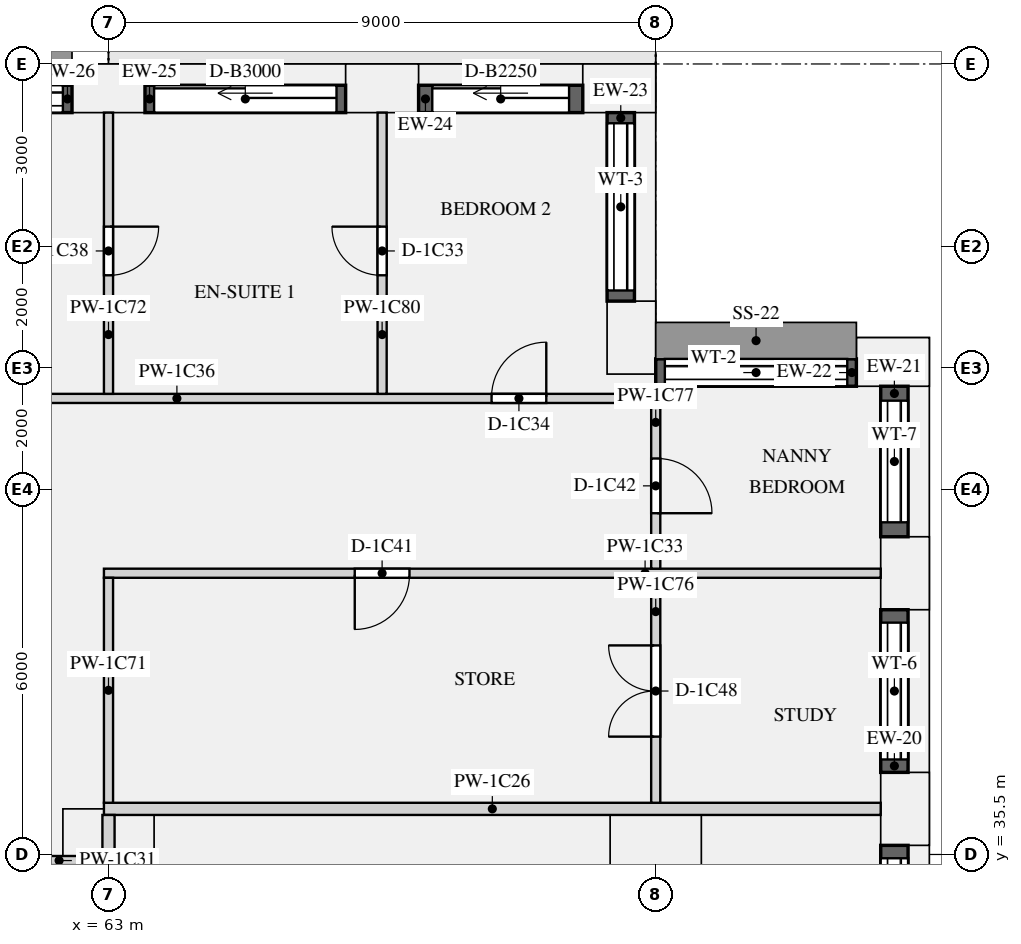
"""IFC4 building model, lengths in metres.
Left out: names, types, materials, properties, quantities, classifications, styles, units other than length and angle.
Written with IfcOpenShell. Run it as: python <this file> out.ifc"""

import sys

from ifc_helpers import new_model, si_unit, direction, frame, frame_2d, origin, origin_2d, place, context, subcontext, project, spatial, rectangle, extrude, element, fill, save


model = new_model("IFC4")
c1 = context("Model", 3, precision=1e-05, world=origin(), true_north=direction((0.0, 1.0)))
c2 = subcontext(c1, "Body", "Model", "MODEL_VIEW")
j1 = project(units=[si_unit("LENGTHUNIT", "METRE"), si_unit("PLANEANGLEUNIT", "RADIAN")], contexts=[c1])
p1 = place(None, origin())
s1 = spatial("IfcSite", under=j1, at=p1, CompositionType="ELEMENT")
p2 = place(p1, origin())
s2 = spatial("IfcBuilding", under=s1, at=p2, CompositionType="ELEMENT")
p3 = place(p2, frame((0.0, 0.0, 38.4)))
s3 = spatial("IfcBuildingStorey", under=s2, at=p3, CompositionType="ELEMENT", Elevation=38.4)
for number, where, z_axis, x_axis in (
    (1, (76.1, 36.25, 0.0), (0.0, 0.0, 1.0), (0.0, 1.0, 0.0)),
    (2, (76.1, 40.125, 0.0), (0.0, 0.0, 1.0), (0.0, 1.0, 0.0)),
    (3, (75.9, 43.6, 0.0), (0.0, 0.0, 1.0), (-1.0, 0.0, 0.0)),
    (4, (71.6, 44.0, 0.0), (0.0, 0.0, 1.0), (0.0, 1.0, 0.0)),
    (5, (71.4, 48.1, 0.0), (0.0, 0.0, 1.0), (-1.0, 0.0, 0.0)),
    (6, (67.5, 48.1, 0.0), (0.0, 0.0, 1.0), (-1.0, 0.0, 0.0)),
    (7, (63.0, 48.1, 0.0), (0.0, 0.0, 1.0), (-1.0, 0.0, 0.0)),
):
    element("IfcColumn", number, at=place(p3, frame(where, z_axis=z_axis, x_axis=x_axis)), inside=s3, PredefinedType="USERDEFINED", context=c2, shape_type="SweptSolid", body=[
        extrude(rectangle(XDim=1.2, YDim=0.8, at=origin_2d()), origin(), (0.0, 0.0, 1.0), 3.15),
    ])
for number, where, z_axis, x_axis in (
    (8, (63.0, 35.5, 0.0), (0.0, 0.0, 1.0), (1.0, 0.0, 0.0)),
    (9, (72.0, 35.5, 0.0), (0.0, 0.0, 1.0), (1.0, 0.0, 0.0)),
):
    element("IfcColumn", number, at=place(p3, frame(where, z_axis=z_axis, x_axis=x_axis)), inside=s3, PredefinedType="COLUMN", context=c2, shape_type="SweptSolid", body=[
        extrude(rectangle(XDim=1.5, YDim=1.5, at=origin_2d()), origin(), (0.0, 0.0, 1.0), 3.15),
    ])
p4 = place(p3, frame((75.925, 32.975, 0.9), z_axis=(0.0, 0.0, 1.0), x_axis=(0.0, 1.0, 0.0)))
e10 = element("IfcWall", 10, at=p4, inside=s3, PredefinedType="SOLIDWALL", context=c2, shape_type="SweptSolid", body=[
    extrude(rectangle(XDim=2.675, YDim=0.45, at=frame_2d((1.337, 0.0))), origin(), (0.0, 0.0, 1.0), 1.93),
])
p5 = place(p4, frame((0.212, 0.0, 0.15)))
e11 = element("IfcOpeningElement", 11, at=p5, cuts=e10, PredefinedType="OPENING", context=c2, shape_type="SweptSolid", body=[
    extrude(rectangle(XDim=2.25, YDim=1.5, at=frame_2d((1.125, 0.75))), frame((0.0, 0.235, 0.0), z_axis=(0.0, -1.0, 0.0), x_axis=(1.0, 0.0, 0.0)), (0.0, 0.0, 1.0), 0.47),
])
p6 = place(p3, frame((75.925, 36.85, 0.9), z_axis=(0.0, 0.0, 1.0), x_axis=(0.0, 1.0, 0.0)))
e12 = element("IfcWall", 12, at=p6, inside=s3, PredefinedType="SOLIDWALL", context=c2, shape_type="SweptSolid", body=[
    extrude(rectangle(XDim=2.675, YDim=0.45, at=frame_2d((1.337, 0.0))), origin(), (0.0, 0.0, 1.0), 1.93),
])
p7 = place(p6, frame((0.212, 0.0, 0.15)))
e13 = element("IfcOpeningElement", 13, at=p7, cuts=e12, PredefinedType="OPENING", context=c2, shape_type="SweptSolid", body=[
    extrude(rectangle(XDim=2.25, YDim=1.5, at=frame_2d((1.125, 0.75))), frame((0.0, 0.235, 0.0), z_axis=(0.0, -1.0, 0.0), x_axis=(1.0, 0.0, 0.0)), (0.0, 0.0, 1.0), 0.47),
])
p8 = place(p3, frame((75.925, 40.725, 0.9), z_axis=(0.0, 0.0, 1.0), x_axis=(0.0, 1.0, 0.0)))
e14 = element("IfcWall", 14, at=p8, inside=s3, PredefinedType="SOLIDWALL", context=c2, shape_type="SweptSolid", body=[
    extrude(rectangle(XDim=2.475, YDim=0.45, at=frame_2d((1.237, 0.0))), origin(), (0.0, 0.0, 1.0), 1.93),
])
p9 = place(p8, frame((0.238, 0.0, 0.15)))
e15 = element("IfcOpeningElement", 15, at=p9, cuts=e14, PredefinedType="OPENING", context=c2, shape_type="SweptSolid", body=[
    extrude(rectangle(XDim=2.0, YDim=1.5, at=frame_2d((1.0, 0.75))), frame((0.0, 0.235, 0.0), z_axis=(0.0, -1.0, 0.0), x_axis=(1.0, 0.0, 0.0)), (0.0, 0.0, 1.0), 0.47),
])
p10 = place(p3, frame((75.3, 43.425, 0.9), z_axis=(0.0, 0.0, 1.0), x_axis=(-1.0, 0.0, 0.0)))
e16 = element("IfcWall", 16, at=p10, inside=s3, PredefinedType="SOLIDWALL", context=c2, shape_type="SweptSolid", body=[
    extrude(rectangle(XDim=3.3, YDim=0.45, at=frame_2d((1.65, 0.0))), origin(), (0.0, 0.0, 1.0), 1.93),
])
p11 = place(p10, frame((0.15, 0.0, 0.15)))
e17 = element("IfcOpeningElement", 17, at=p11, cuts=e16, PredefinedType="OPENING", context=c2, shape_type="SweptSolid", body=[
    extrude(rectangle(XDim=3.0, YDim=1.5, at=frame_2d((1.5, 0.75))), frame((0.0, 0.235, 0.0), z_axis=(0.0, -1.0, 0.0), x_axis=(1.0, 0.0, 0.0)), (0.0, 0.0, 1.0), 0.47),
])
p12 = place(p3, frame((71.425, 44.6, 0.9), z_axis=(0.0, 0.0, 1.0), x_axis=(0.0, 1.0, 0.0)))
e18 = element("IfcWall", 18, at=p12, inside=s3, PredefinedType="SOLIDWALL", context=c2, shape_type="SweptSolid", body=[
    extrude(rectangle(XDim=3.1, YDim=0.45, at=frame_2d((1.55, 0.0))), origin(), (0.0, 0.0, 1.0), 1.93),
])
p13 = place(p12, frame((0.175, 0.0, 0.15)))
e19 = element("IfcOpeningElement", 19, at=p13, cuts=e18, PredefinedType="OPENING", context=c2, shape_type="SweptSolid", body=[
    extrude(rectangle(XDim=2.75, YDim=1.5, at=frame_2d((1.375, 0.75))), frame((0.0, 0.235, 0.0), z_axis=(0.0, -1.0, 0.0), x_axis=(1.0, 0.0, 0.0)), (0.0, 0.0, 1.0), 0.47),
])
p14 = place(p3, frame((70.8, 47.925, 0.0), z_axis=(0.0, 0.0, 1.0), x_axis=(-1.0, 0.0, 0.0)))
e20 = element("IfcWall", 20, at=p14, inside=s3, PredefinedType="SOLIDWALL", context=c2, shape_type="SweptSolid", body=[
    extrude(rectangle(XDim=2.7, YDim=0.45, at=frame_2d((1.35, 0.0))), origin(), (0.0, 0.0, 1.0), 2.83),
])
p15 = place(p14, frame((0.225, 0.0, 0.0)))
e21 = element("IfcOpeningElement", 21, at=p15, cuts=e20, PredefinedType="OPENING", context=c2, shape_type="SweptSolid", body=[
    extrude(rectangle(XDim=2.25, YDim=2.3, at=frame_2d((1.125, 1.15))), frame((0.0, 0.235, 0.0), z_axis=(0.0, -1.0, 0.0), x_axis=(1.0, 0.0, 0.0)), (0.0, 0.0, 1.0), 0.47),
])
p16 = place(p3, frame((66.9, 47.925, 0.0), z_axis=(0.0, 0.0, 1.0), x_axis=(-1.0, 0.0, 0.0)))
e22 = element("IfcWall", 22, at=p16, inside=s3, PredefinedType="SOLIDWALL", context=c2, shape_type="SweptSolid", body=[
    extrude(rectangle(XDim=3.3, YDim=0.45, at=frame_2d((1.65, 0.0))), origin(), (0.0, 0.0, 1.0), 2.83),
])
p17 = place(p16, frame((0.15, 0.0, 0.0)))
e23 = element("IfcOpeningElement", 23, at=p17, cuts=e22, PredefinedType="OPENING", context=c2, shape_type="SweptSolid", body=[
    extrude(rectangle(XDim=3.0, YDim=2.3, at=frame_2d((1.5, 1.15))), frame((0.0, 0.235, 0.0), z_axis=(0.0, -1.0, 0.0), x_axis=(1.0, 0.0, 0.0)), (0.0, 0.0, 1.0), 0.47),
])
p18 = place(p3, frame((62.4, 47.925, 0.9), z_axis=(0.0, 0.0, 1.0), x_axis=(-1.0, 0.0, 0.0)))
e24 = element("IfcWall", 24, at=p18, inside=s3, PredefinedType="SOLIDWALL", context=c2, shape_type="SweptSolid", body=[
    extrude(rectangle(XDim=3.3, YDim=0.45, at=frame_2d((1.65, 0.0))), origin(), (0.0, 0.0, 1.0), 1.93),
])
p19 = place(p18, frame((0.15, 0.0, 0.15)))
e25 = element("IfcOpeningElement", 25, at=p19, cuts=e24, PredefinedType="OPENING", context=c2, shape_type="SweptSolid", body=[
    extrude(rectangle(XDim=3.0, YDim=1.5, at=frame_2d((1.5, 0.75))), frame((0.0, 0.235, 0.0), z_axis=(0.0, -1.0, 0.0), x_axis=(1.0, 0.0, 0.0)), (0.0, 0.0, 1.0), 0.47),
])
p20 = place(p3, frame((62.925, 36.25, 0.0), z_axis=(0.0, 0.0, 1.0), x_axis=(1.0, 0.0, 0.0)))
e26 = element("IfcWall", 26, at=p20, inside=s3, PredefinedType="PARTITIONING", context=c2, shape_type="SweptSolid", body=[
    extrude(rectangle(XDim=12.775, YDim=0.2, at=frame_2d((6.387, 0.0))), origin(), (0.0, 0.0, 1.0), 2.83),
])
p21 = place(p3, frame((59.8, 35.4, 0.0), z_axis=(0.0, 0.0, 1.0), x_axis=(1.0, 0.0, 0.0)))
e27 = element("IfcWall", 27, at=p21, inside=s3, PredefinedType="PARTITIONING", context=c2, shape_type="SweptSolid", body=[
    extrude(rectangle(XDim=3.1, YDim=0.15, at=frame_2d((1.55, 0.0))), origin(), (0.0, 0.0, 1.0), 2.83),
])
p22 = place(p21, frame((0.775, 0.0, 0.0)))
e28 = element("IfcOpeningElement", 28, at=p22, cuts=e27, PredefinedType="OPENING", context=c2, shape_type="SweptSolid", body=[
    extrude(rectangle(XDim=0.9, YDim=2.1, at=frame_2d((0.45, 1.05))), frame((0.0, 0.085, 0.0), z_axis=(0.0, -1.0, 0.0), x_axis=(1.0, 0.0, 0.0)), (0.0, 0.0, 1.0), 0.17),
])
p23 = place(p3, frame((62.925, 40.125, 0.0), z_axis=(0.0, 0.0, 1.0), x_axis=(1.0, 0.0, 0.0)))
e29 = element("IfcWall", 29, at=p23, inside=s3, PredefinedType="PARTITIONING", context=c2, shape_type="SweptSolid", body=[
    extrude(rectangle(XDim=12.775, YDim=0.15, at=frame_2d((6.387, 0.0))), origin(), (0.0, 0.0, 1.0), 2.83),
])
p24 = place(p23, frame((4.125, 0.0, 0.0)))
e30 = element("IfcOpeningElement", 30, at=p24, cuts=e29, PredefinedType="OPENING", context=c2, shape_type="SweptSolid", body=[
    extrude(rectangle(XDim=0.9, YDim=2.1, at=frame_2d((0.45, 1.05))), frame((0.0, 0.085, 0.0), z_axis=(0.0, -1.0, 0.0), x_axis=(1.0, 0.0, 0.0)), (0.0, 0.0, 1.0), 0.17),
])
p25 = place(p3, frame((54.075, 43.0, 0.0), z_axis=(0.0, 0.0, 1.0), x_axis=(1.0, 0.0, 0.0)))
e31 = element("IfcWall", 31, at=p25, inside=s3, PredefinedType="PARTITIONING", context=c2, shape_type="SweptSolid", body=[
    extrude(rectangle(XDim=17.85, YDim=0.15, at=frame_2d((8.925, 0.0))), origin(), (0.0, 0.0, 1.0), 2.83),
])
p26 = place(p25, frame((15.225, 0.0, 0.0)))
e32 = element("IfcOpeningElement", 32, at=p26, cuts=e31, PredefinedType="OPENING", context=c2, shape_type="SweptSolid", body=[
    extrude(rectangle(XDim=0.9, YDim=2.1, at=frame_2d((0.45, 1.05))), frame((0.0, 0.085, 0.0), z_axis=(0.0, -1.0, 0.0), x_axis=(1.0, 0.0, 0.0)), (0.0, 0.0, 1.0), 0.17),
])
p27 = place(p25, frame((3.975, 0.0, 0.0)))
e33 = element("IfcOpeningElement", 33, at=p27, cuts=e31, PredefinedType="OPENING", context=c2, shape_type="SweptSolid", body=[
    extrude(rectangle(XDim=0.9, YDim=2.1, at=frame_2d((0.45, 1.05))), frame((0.0, 0.085, 0.0), z_axis=(0.0, -1.0, 0.0), x_axis=(1.0, 0.0, 0.0)), (0.0, 0.0, 1.0), 0.17),
])
p28 = place(p3, frame((63.0, 36.35, 0.0), z_axis=(0.0, 0.0, 1.0), x_axis=(0.0, 1.0, 0.0)))
e34 = element("IfcWall", 34, at=p28, inside=s3, PredefinedType="PARTITIONING", context=c2, shape_type="SweptSolid", body=[
    extrude(rectangle(XDim=3.7, YDim=0.15, at=frame_2d((1.85, 0.0))), origin(), (0.0, 0.0, 1.0), 2.83),
])
p29 = place(p3, frame((63.0, 43.075, 0.0), z_axis=(0.0, 0.0, 1.0), x_axis=(0.0, 1.0, 0.0)))
e35 = element("IfcWall", 35, at=p29, inside=s3, PredefinedType="PARTITIONING", context=c2, shape_type="SweptSolid", body=[
    extrude(rectangle(XDim=4.625, YDim=0.15, at=frame_2d((2.312, 0.0))), origin(), (0.0, 0.0, 1.0), 2.83),
])
p30 = place(p29, frame((1.95, 0.0, 0.0)))
e36 = element("IfcOpeningElement", 36, at=p30, cuts=e35, PredefinedType="OPENING", context=c2, shape_type="SweptSolid", body=[
    extrude(rectangle(XDim=0.8, YDim=2.1, at=frame_2d((0.4, 1.05))), frame((0.0, 0.085, 0.0), z_axis=(0.0, -1.0, 0.0), x_axis=(1.0, 0.0, 0.0)), (0.0, 0.0, 1.0), 0.17),
])
p31 = place(p3, frame((63.0, 24.075, 0.0), z_axis=(0.0, 0.0, 1.0), x_axis=(0.0, 1.0, 0.0)))
e37 = element("IfcWall", 37, at=p31, inside=s3, PredefinedType="PARTITIONING", context=c2, shape_type="SweptSolid", body=[
    extrude(rectangle(XDim=12.075, YDim=0.2, at=frame_2d((6.038, 0.0))), origin(), (0.0, 0.0, 1.0), 2.83),
])
p32 = place(p3, frame((72.0, 36.35, 0.0), z_axis=(0.0, 0.0, 1.0), x_axis=(0.0, 1.0, 0.0)))
e38 = element("IfcWall", 38, at=p32, inside=s3, PredefinedType="PARTITIONING", context=c2, shape_type="SweptSolid", body=[
    extrude(rectangle(XDim=3.7, YDim=0.15, at=frame_2d((1.85, 0.0))), origin(), (0.0, 0.0, 1.0), 2.83),
])
p33 = place(p32, frame((1.088, 0.0, 0.0)))
e39 = element("IfcOpeningElement", 39, at=p33, cuts=e38, PredefinedType="OPENING", context=c2, shape_type="SweptSolid", body=[
    extrude(rectangle(XDim=1.5, YDim=2.1, at=frame_2d((0.75, 1.05))), frame((0.0, 0.085, 0.0), z_axis=(0.0, -1.0, 0.0), x_axis=(1.0, 0.0, 0.0)), (0.0, 0.0, 1.0), 0.17),
])
p34 = place(p3, frame((72.0, 40.2, 0.0), z_axis=(0.0, 0.0, 1.0), x_axis=(0.0, 1.0, 0.0)))
e40 = element("IfcWall", 40, at=p34, inside=s3, PredefinedType="PARTITIONING", context=c2, shape_type="SweptSolid", body=[
    extrude(rectangle(XDim=3.0, YDim=0.15, at=frame_2d((1.5, 0.0))), origin(), (0.0, 0.0, 1.0), 2.83),
])
p35 = place(p34, frame((0.912, 0.0, 0.0)))
e41 = element("IfcOpeningElement", 41, at=p35, cuts=e40, PredefinedType="OPENING", context=c2, shape_type="SweptSolid", body=[
    extrude(rectangle(XDim=0.9, YDim=2.1, at=frame_2d((0.45, 1.05))), frame((0.0, 0.085, 0.0), z_axis=(0.0, -1.0, 0.0), x_axis=(1.0, 0.0, 0.0)), (0.0, 0.0, 1.0), 0.17),
])
p36 = place(p3, frame((67.5, 43.075, 0.0), z_axis=(0.0, 0.0, 1.0), x_axis=(0.0, 1.0, 0.0)))
e42 = element("IfcWall", 42, at=p36, inside=s3, PredefinedType="PARTITIONING", context=c2, shape_type="SweptSolid", body=[
    extrude(rectangle(XDim=4.625, YDim=0.15, at=frame_2d((2.312, 0.0))), origin(), (0.0, 0.0, 1.0), 2.83),
])
p37 = place(p36, frame((1.95, 0.0, 0.0)))
e43 = element("IfcOpeningElement", 43, at=p37, cuts=e42, PredefinedType="OPENING", context=c2, shape_type="SweptSolid", body=[
    extrude(rectangle(XDim=0.8, YDim=2.1, at=frame_2d((0.4, 1.05))), frame((0.0, 0.085, 0.0), z_axis=(0.0, -1.0, 0.0), x_axis=(1.0, 0.0, 0.0)), (0.0, 0.0, 1.0), 0.17),
])
p38 = place(p5, origin())
e44 = element("IfcWindow", 44, at=p38, inside=s3, PartitioningType="SINGLE_PANEL", PredefinedType="WINDOW", context=c2, shape_type="SweptSolid", body=[
    extrude(rectangle(XDim=2.25, YDim=1.5, at=frame_2d((1.125, 0.75))), frame((0.0, -0.065, 0.0), z_axis=(0.0, -1.0, 0.0), x_axis=(1.0, 0.0, 0.0)), (0.0, 0.0, 1.0), 0.06),
])
fill(e11, e44)
p39 = place(p7, origin())
e45 = element("IfcWindow", 45, at=p39, inside=s3, PartitioningType="SINGLE_PANEL", PredefinedType="WINDOW", context=c2, shape_type="SweptSolid", body=[
    extrude(rectangle(XDim=2.25, YDim=1.5, at=frame_2d((1.125, 0.75))), frame((0.0, -0.065, 0.0), z_axis=(0.0, -1.0, 0.0), x_axis=(1.0, 0.0, 0.0)), (0.0, 0.0, 1.0), 0.06),
])
fill(e13, e45)
p40 = place(p9, origin())
e46 = element("IfcWindow", 46, at=p40, inside=s3, PartitioningType="SINGLE_PANEL", PredefinedType="WINDOW", context=c2, shape_type="SweptSolid", body=[
    extrude(rectangle(XDim=2.0, YDim=1.5, at=frame_2d((1.0, 0.75))), frame((0.0, -0.065, 0.0), z_axis=(0.0, -1.0, 0.0), x_axis=(1.0, 0.0, 0.0)), (0.0, 0.0, 1.0), 0.06),
])
fill(e15, e46)
p41 = place(p11, origin())
e47 = element("IfcWindow", 47, at=p41, inside=s3, PartitioningType="SINGLE_PANEL", PredefinedType="WINDOW", context=c2, shape_type="SweptSolid", body=[
    extrude(rectangle(XDim=3.0, YDim=1.5, at=frame_2d((1.5, 0.75))), frame((0.0, -0.065, 0.0), z_axis=(0.0, -1.0, 0.0), x_axis=(1.0, 0.0, 0.0)), (0.0, 0.0, 1.0), 0.06),
])
fill(e17, e47)
p42 = place(p13, origin())
e48 = element("IfcWindow", 48, at=p42, inside=s3, PartitioningType="SINGLE_PANEL", PredefinedType="WINDOW", context=c2, shape_type="SweptSolid", body=[
    extrude(rectangle(XDim=2.75, YDim=1.5, at=frame_2d((1.375, 0.75))), frame((0.0, -0.065, 0.0), z_axis=(0.0, -1.0, 0.0), x_axis=(1.0, 0.0, 0.0)), (0.0, 0.0, 1.0), 0.06),
])
fill(e19, e48)
p43 = place(p15, origin())
e49 = element("IfcDoor", 49, at=p43, inside=s3, OperationType="SLIDING_TO_LEFT", PredefinedType="DOOR", context=c2, shape_type="SweptSolid", body=[
    extrude(rectangle(XDim=2.25, YDim=2.3, at=frame_2d((1.125, 1.15))), frame((0.0, -0.07, 0.0), z_axis=(0.0, -1.0, 0.0), x_axis=(1.0, 0.0, 0.0)), (0.0, 0.0, 1.0), 0.05),
])
fill(e21, e49)
p44 = place(p17, origin())
e50 = element("IfcDoor", 50, at=p44, inside=s3, OperationType="SLIDING_TO_LEFT", PredefinedType="DOOR", context=c2, shape_type="SweptSolid", body=[
    extrude(rectangle(XDim=3.0, YDim=2.3, at=frame_2d((1.5, 1.15))), frame((0.0, -0.07, 0.0), z_axis=(0.0, -1.0, 0.0), x_axis=(1.0, 0.0, 0.0)), (0.0, 0.0, 1.0), 0.05),
])
fill(e23, e50)
p45 = place(p19, origin())
e51 = element("IfcWindow", 51, at=p45, inside=s3, PartitioningType="SINGLE_PANEL", PredefinedType="WINDOW", context=c2, shape_type="SweptSolid", body=[
    extrude(rectangle(XDim=3.0, YDim=1.5, at=frame_2d((1.5, 0.75))), frame((0.0, -0.065, 0.0), z_axis=(0.0, -1.0, 0.0), x_axis=(1.0, 0.0, 0.0)), (0.0, 0.0, 1.0), 0.06),
])
fill(e25, e51)
p46 = place(p37, origin())
e52 = element("IfcDoor", 52, at=p46, inside=s3, OperationType="SINGLE_SWING_RIGHT", PredefinedType="DOOR", context=c2, shape_type="SweptSolid", body=[
    extrude(rectangle(XDim=0.8, YDim=2.1, at=frame_2d((0.4, 1.05))), frame((0.0, 0.025, 0.0), z_axis=(0.0, -1.0, 0.0), x_axis=(1.0, 0.0, 0.0)), (0.0, 0.0, 1.0), 0.05),
])
fill(e43, e52)
p47 = place(p26, origin())
e53 = element("IfcDoor", 53, at=p47, inside=s3, OperationType="SINGLE_SWING_RIGHT", PredefinedType="DOOR", context=c2, shape_type="SweptSolid", body=[
    extrude(rectangle(XDim=0.9, YDim=2.1, at=frame_2d((0.45, 1.05))), frame((0.0, 0.025, 0.0), z_axis=(0.0, -1.0, 0.0), x_axis=(1.0, 0.0, 0.0)), (0.0, 0.0, 1.0), 0.05),
])
fill(e32, e53)
p48 = place(p30, frame((0.8, 0.0, 0.0), z_axis=(0.0, 0.0, 1.0), x_axis=(-1.0, 0.0, 0.0)))
e54 = element("IfcDoor", 54, at=p48, inside=s3, OperationType="SINGLE_SWING_LEFT", PredefinedType="DOOR", context=c2, shape_type="SweptSolid", body=[
    extrude(rectangle(XDim=0.8, YDim=2.1, at=frame_2d((0.4, 1.05))), frame((0.0, 0.025, 0.0), z_axis=(0.0, -1.0, 0.0), x_axis=(1.0, 0.0, 0.0)), (0.0, 0.0, 1.0), 0.05),
])
fill(e36, e54)
p49 = place(p24, frame((0.9, 0.0, 0.0), z_axis=(0.0, 0.0, 1.0), x_axis=(-1.0, 0.0, 0.0)))
e55 = element("IfcDoor", 55, at=p49, inside=s3, OperationType="SINGLE_SWING_RIGHT", PredefinedType="DOOR", context=c2, shape_type="SweptSolid", body=[
    extrude(rectangle(XDim=0.9, YDim=2.1, at=frame_2d((0.45, 1.05))), frame((0.0, 0.025, 0.0), z_axis=(0.0, -1.0, 0.0), x_axis=(1.0, 0.0, 0.0)), (0.0, 0.0, 1.0), 0.05),
])
fill(e30, e55)
p50 = place(p35, frame((0.9, 0.0, 0.0), z_axis=(0.0, 0.0, 1.0), x_axis=(-1.0, 0.0, 0.0)))
e56 = element("IfcDoor", 56, at=p50, inside=s3, OperationType="SINGLE_SWING_RIGHT", PredefinedType="DOOR", context=c2, shape_type="SweptSolid", body=[
    extrude(rectangle(XDim=0.9, YDim=2.1, at=frame_2d((0.45, 1.05))), frame((0.0, 0.025, 0.0), z_axis=(0.0, -1.0, 0.0), x_axis=(1.0, 0.0, 0.0)), (0.0, 0.0, 1.0), 0.05),
])
fill(e41, e56)
p51 = place(p33, origin())
e57 = element("IfcDoor", 57, at=p51, inside=s3, OperationType="DOUBLE_DOOR_SINGLE_SWING", PredefinedType="DOOR", context=c2, shape_type="SweptSolid", body=[
    extrude(rectangle(XDim=1.5, YDim=2.1, at=frame_2d((0.75, 1.05))), frame((0.0, 0.025, 0.0), z_axis=(0.0, -1.0, 0.0), x_axis=(1.0, 0.0, 0.0)), (0.0, 0.0, 1.0), 0.05),
])
fill(e39, e57)
save(model, sys.argv[1])
